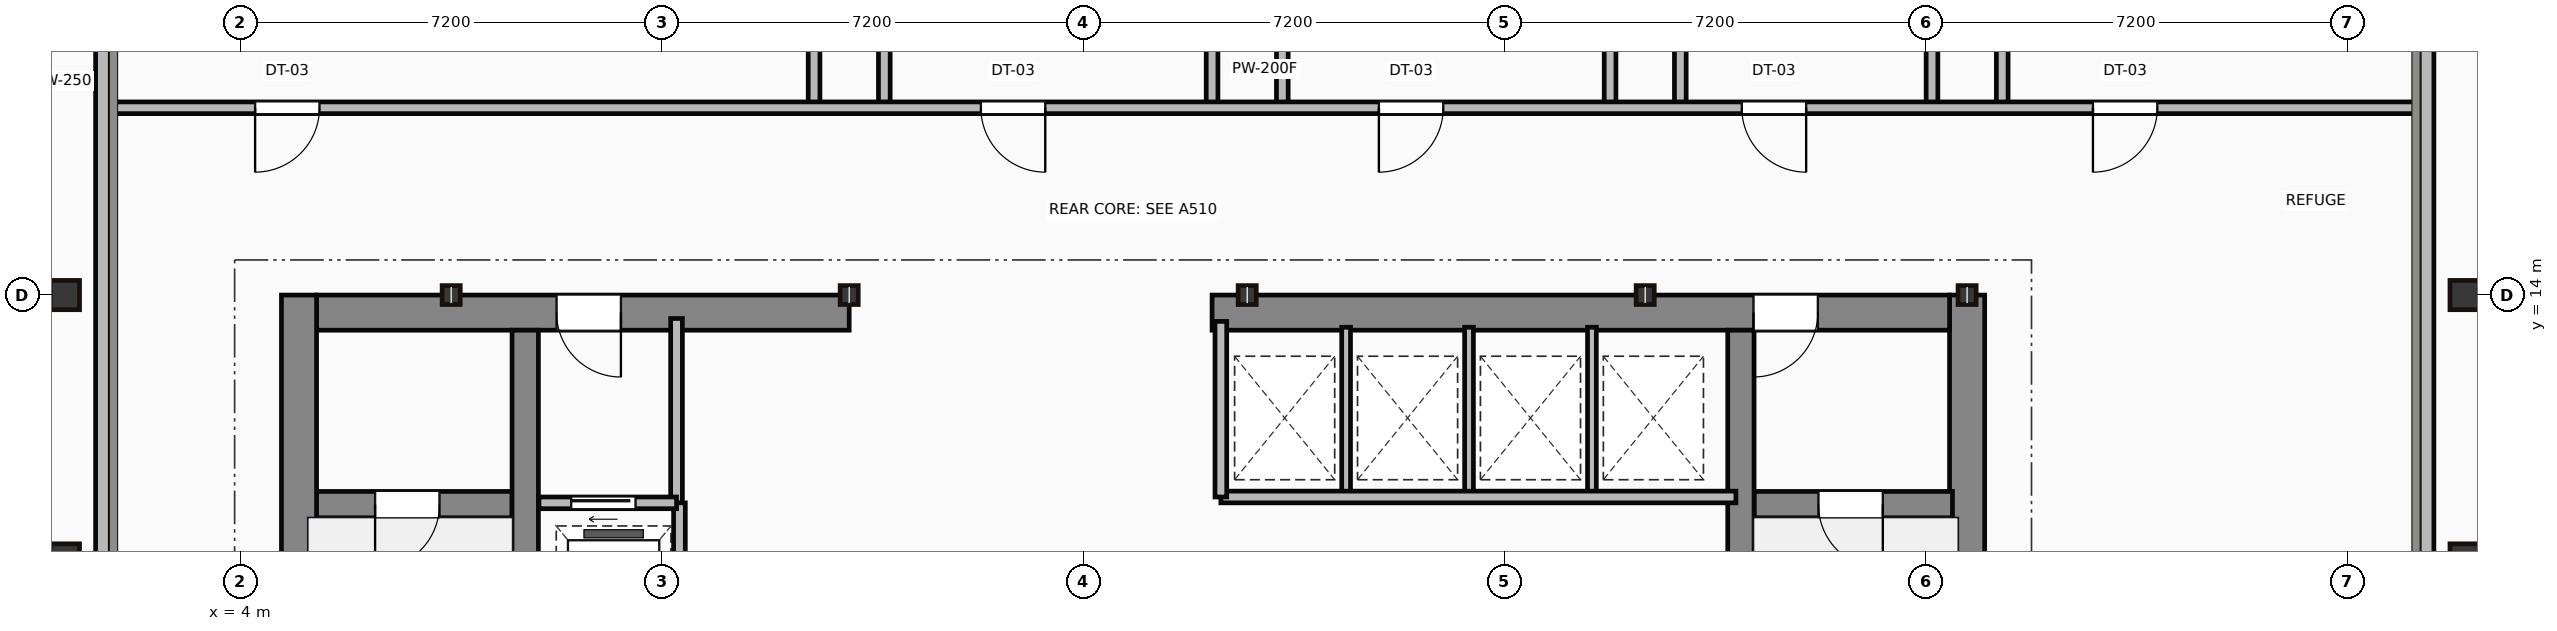
"""IFC4 building model, lengths in metres.
Left out: names, types, materials, properties, quantities, classifications, styles, units other than length and angle.
Written with IfcOpenShell. Run it as: python <this file> out.ifc"""

import sys

from ifc_helpers import new_model, si_unit, direction, frame, frame_2d, origin, origin_2d, place, context, subcontext, project, spatial, rectangle, hollow_rectangle, i_section, extrude, source, transform, mapped, element, fill, save


model = new_model("IFC4")
c1 = context("Model", 3, precision=1e-05, world=origin(), true_north=direction((0.0, 1.0)))
c2 = subcontext(c1, "Body", "Model", "MODEL_VIEW")
j1 = project(units=[si_unit("LENGTHUNIT", "METRE"), si_unit("PLANEANGLEUNIT", "RADIAN")], contexts=[c1])
p1 = place(None, origin())
s1 = spatial("IfcSite", under=j1, at=p1, CompositionType="ELEMENT")
p2 = place(p1, origin())
s2 = spatial("IfcBuilding", under=s1, at=p2, CompositionType="ELEMENT")
p3 = place(p2, frame((0.0, 0.0, 236.05)))
s3 = spatial("IfcBuildingStorey", under=s2, at=p3, CompositionType="ELEMENT", Elevation=236.05)
m1 = source(origin(), c2, "Body", "SweptSolid", [
    extrude(rectangle(XDim=13.1, YDim=0.6, at=frame_2d((6.55, 0.0))), origin(), (0.0, 0.0, 1.0), 4.5),
])
for number, where, z_axis, x_axis in (
    (1, (5.0, 0.9, 0.0), (0.0, 0.0, 1.0), (0.0, 1.0, 0.0)),
    (2, (33.5, 0.9, 0.0), (0.0, 0.0, 1.0), (0.0, 1.0, 0.0)),
):
    element("IfcWall", number, at=place(p3, frame(where, z_axis=z_axis, x_axis=x_axis)), inside=s3, PredefinedType="SHEAR", context=c2, shape_type="MappedRepresentation", body=[
        mapped(m1, transform((0.0, 0.0, 0.0))),
    ])
m2 = source(origin(), c2, "Body", "SweptSolid", [
    extrude(rectangle(XDim=9.1, YDim=0.6, at=frame_2d((4.55, 0.0))), origin(), (0.0, 0.0, 1.0), 4.5),
])
p4 = place(p3, frame((5.3, 13.7, 0.0), z_axis=(0.0, 0.0, 1.0), x_axis=(1.0, 0.0, 0.0)))
e3 = element("IfcWall", 3, at=p4, inside=s3, PredefinedType="SHEAR", context=c2, shape_type="MappedRepresentation", body=[
    mapped(m2, transform((0.0, 0.0, 0.0))),
])
p5 = place(p4, frame((4.1, 0.0, 0.0)))
e4 = element("IfcOpeningElement", 4, at=p5, cuts=e3, PredefinedType="OPENING", context=c2, shape_type="SweptSolid", body=[
    extrude(rectangle(XDim=1.1, YDim=2.15, at=frame_2d((0.55, 1.075))), frame((0.0, 0.31, 0.0), z_axis=(0.0, -1.0, 0.0), x_axis=(1.0, 0.0, 0.0)), (0.0, 0.0, 1.0), 0.62),
])
m3 = source(origin(), c2, "Body", "SweptSolid", [
    extrude(rectangle(XDim=12.6, YDim=0.6, at=frame_2d((6.3, 0.0))), origin(), (0.0, 0.0, 1.0), 4.5),
])
p6 = place(p3, frame((20.6, 13.7, 0.0), z_axis=(0.0, 0.0, 1.0), x_axis=(1.0, 0.0, 0.0)))
e5 = element("IfcWall", 5, at=p6, inside=s3, PredefinedType="SHEAR", context=c2, shape_type="MappedRepresentation", body=[
    mapped(m3, transform((0.0, 0.0, 0.0))),
])
p7 = place(p6, frame((9.25, 0.0, 0.0)))
e6 = element("IfcOpeningElement", 6, at=p7, cuts=e5, PredefinedType="OPENING", context=c2, shape_type="SweptSolid", body=[
    extrude(rectangle(XDim=1.1, YDim=2.15, at=frame_2d((0.55, 1.075))), frame((0.0, 0.31, 0.0), z_axis=(0.0, -1.0, 0.0), x_axis=(1.0, 0.0, 0.0)), (0.0, 0.0, 1.0), 0.62),
])
m4 = source(origin(), c2, "Body", "SweptSolid", [
    extrude(rectangle(XDim=12.5, YDim=0.45, at=frame_2d((6.25, 0.0))), origin(), (0.0, 0.0, 1.0), 4.5),
])
for number, where, z_axis, x_axis in (
    (7, (8.865, 0.9, 0.0), (0.0, 0.0, 1.0), (0.0, 1.0, 0.0)),
    (8, (29.635, 0.9, 0.0), (0.0, 0.0, 1.0), (0.0, 1.0, 0.0)),
):
    element("IfcWall", number, at=place(p3, frame(where, z_axis=z_axis, x_axis=x_axis)), inside=s3, PredefinedType="SHEAR", context=c2, shape_type="MappedRepresentation", body=[
        mapped(m4, transform((0.0, 0.0, 0.0))),
    ])
m5 = source(origin(), c2, "Body", "SweptSolid", [
    extrude(rectangle(XDim=3.39, YDim=0.45, at=frame_2d((1.695, 0.0))), origin(), (0.0, 0.0, 1.0), 4.5),
])
p8 = place(p3, frame((5.25, 10.42, 0.0), z_axis=(0.0, 0.0, 1.0), x_axis=(1.0, 0.0, 0.0)))
e9 = element("IfcWall", 9, at=p8, inside=s3, PredefinedType="SHEAR", context=c2, shape_type="MappedRepresentation", body=[
    mapped(m5, transform((0.0, 0.0, 0.0))),
])
p9 = place(p8, frame((1.05, 0.0, 0.0)))
e10 = element("IfcOpeningElement", 10, at=p9, cuts=e9, PredefinedType="OPENING", context=c2, shape_type="SweptSolid", body=[
    extrude(rectangle(XDim=1.1, YDim=2.15, at=frame_2d((0.55, 1.075))), frame((0.0, 0.235, 0.0), z_axis=(0.0, -1.0, 0.0), x_axis=(1.0, 0.0, 0.0)), (0.0, 0.0, 1.0), 0.47),
])
p10 = place(p3, frame((29.86, 10.42, 0.0), z_axis=(0.0, 0.0, 1.0), x_axis=(1.0, 0.0, 0.0)))
e11 = element("IfcWall", 11, at=p10, inside=s3, PredefinedType="SHEAR", context=c2, shape_type="MappedRepresentation", body=[
    mapped(m5, transform((0.0, 0.0, 0.0))),
])
p11 = place(p10, frame((1.1, 0.0, 0.0)))
e12 = element("IfcOpeningElement", 12, at=p11, cuts=e11, PredefinedType="OPENING", context=c2, shape_type="SweptSolid", body=[
    extrude(rectangle(XDim=1.1, YDim=2.15, at=frame_2d((0.55, 1.075))), frame((0.0, 0.235, 0.0), z_axis=(0.0, -1.0, 0.0), x_axis=(1.0, 0.0, 0.0)), (0.0, 0.0, 1.0), 0.47),
])
m6 = source(origin(), c2, "Body", "SweptSolid", [
    extrude(hollow_rectangle(XDim=0.5, YDim=0.5, WallThickness=0.022, at=origin_2d()), origin(), (0.0, 0.0, 1.0), 4.5),
])
for number, where, z_axis, x_axis in (
    (13, (1.0, 9.5, 0.0), (0.0, 0.0, 1.0), (1.0, 0.0, 0.0)),
    (14, (1.0, 14.0, 0.0), (0.0, 0.0, 1.0), (1.0, 0.0, 0.0)),
):
    element("IfcColumn", number, at=place(p3, frame(where, z_axis=z_axis, x_axis=x_axis)), inside=s3, PredefinedType="COLUMN", context=c2, shape_type="MappedRepresentation", body=[
        mapped(m6, transform((0.0, 0.0, 0.0))),
    ])
m7 = source(origin(), c2, "Body", "SweptSolid", [
    extrude(i_section(OverallWidth=0.309, OverallDepth=0.323, WebThickness=0.014, FlangeThickness=0.023, at=origin_2d()), origin(), (0.0, 0.0, 1.0), 4.5),
])
for number, where, z_axis, x_axis in (
    (15, (7.6, 14.0, 0.0), (0.0, 0.0, 1.0), (1.0, 0.0, 0.0)),
    (16, (14.4, 14.0, 0.0), (0.0, 0.0, 1.0), (1.0, 0.0, 0.0)),
    (17, (21.2, 14.0, 0.0), (0.0, 0.0, 1.0), (1.0, 0.0, 0.0)),
    (18, (28.0, 14.0, 0.0), (0.0, 0.0, 1.0), (1.0, 0.0, 0.0)),
    (19, (33.5, 14.0, 0.0), (0.0, 0.0, 1.0), (1.0, 0.0, 0.0)),
):
    element("IfcColumn", number, at=place(p3, frame(where, z_axis=z_axis, x_axis=x_axis)), inside=s3, PredefinedType="COLUMN", context=c2, shape_type="MappedRepresentation", body=[
        mapped(m7, transform((0.0, 0.0, 0.0))),
    ])
for number, where, z_axis, x_axis in (
    (20, (42.0, 9.5, 0.0), (0.0, 0.0, 1.0), (1.0, 0.0, 0.0)),
    (21, (42.0, 14.0, 0.0), (0.0, 0.0, 1.0), (1.0, 0.0, 0.0)),
):
    element("IfcColumn", number, at=place(p3, frame(where, z_axis=z_axis, x_axis=x_axis)), inside=s3, PredefinedType="COLUMN", context=c2, shape_type="MappedRepresentation", body=[
        mapped(m6, transform((0.0, 0.0, 0.0))),
    ])
m8 = source(origin(), c2, "Body", "SweptSolid", [
    extrude(rectangle(XDim=24.0, YDim=0.25, at=frame_2d((12.0, 0.0))), origin(), (0.0, 0.0, 1.0), 4.25),
])
p12 = place(p3, frame((1.65, 5.65, 0.0), z_axis=(0.0, 0.0, 1.0), x_axis=(0.0, 1.0, 0.0)))
e22 = element("IfcWall", 22, at=p12, inside=s3, PredefinedType="STANDARD", context=c2, shape_type="MappedRepresentation", body=[
    mapped(m8, transform((0.0, 0.0, 0.0))),
])
m9 = source(origin(), c2, "Body", "SweptSolid", [
    extrude(rectangle(XDim=22.5, YDim=0.25, at=frame_2d((11.25, 0.0))), origin(), (0.0, 0.0, 1.0), 4.25),
])
p13 = place(p3, frame((41.35, 29.65, 0.0), z_axis=(0.0, 0.0, 1.0), x_axis=(0.0, -1.0, 0.0)))
e23 = element("IfcWall", 23, at=p13, inside=s3, PredefinedType="STANDARD", context=c2, shape_type="MappedRepresentation", body=[
    mapped(m9, transform((0.0, 0.0, 0.0))),
])
m10 = source(origin(), c2, "Body", "SweptSolid", [
    extrude(rectangle(XDim=3.18, YDim=0.2, at=frame_2d((1.59, 0.0))), origin(), (0.0, 0.0, 1.0), 4.25),
])
p14 = place(p3, frame((11.45, 10.42, 0.0), z_axis=(0.0, 0.0, 1.0), x_axis=(0.0, 1.0, 0.0)))
e24 = element("IfcWall", 24, at=p14, inside=s3, PredefinedType="PARTITIONING", context=c2, shape_type="MappedRepresentation", body=[
    mapped(m10, transform((0.0, 0.0, 0.0))),
])
m11 = source(origin(), c2, "Body", "SweptSolid", [
    extrude(rectangle(XDim=2.35, YDim=0.2, at=frame_2d((1.175, 0.0))), origin(), (0.0, 0.0, 1.0), 4.25),
])
p15 = place(p3, frame((9.1, 10.45, 0.0), z_axis=(0.0, 0.0, 1.0), x_axis=(1.0, 0.0, 0.0)))
e25 = element("IfcWall", 25, at=p15, inside=s3, PredefinedType="PARTITIONING", context=c2, shape_type="MappedRepresentation", body=[
    mapped(m11, transform((0.0, 0.0, 0.0))),
])
p16 = place(p15, frame((0.55, 0.0, 0.0)))
e26 = element("IfcOpeningElement", 26, at=p16, cuts=e25, PredefinedType="OPENING", context=c2, shape_type="SweptSolid", body=[
    extrude(rectangle(XDim=1.1, YDim=2.15, at=frame_2d((0.55, 1.075))), frame((0.0, 0.11, 0.0), z_axis=(0.0, -1.0, 0.0), x_axis=(1.0, 0.0, 0.0)), (0.0, 0.0, 1.0), 0.22),
])
m12 = source(origin(), c2, "Body", "SweptSolid", [
    extrude(rectangle(XDim=9.6, YDim=0.2, at=frame_2d((4.8, 0.0))), origin(), (0.0, 0.0, 1.0), 4.25),
])
p17 = place(p3, frame((11.5, 0.85, 0.0), z_axis=(0.0, 0.0, 1.0), x_axis=(0.0, 1.0, 0.0)))
e27 = element("IfcWall", 27, at=p17, inside=s3, PredefinedType="PARTITIONING", context=c2, shape_type="MappedRepresentation", body=[
    mapped(m12, transform((0.0, 0.0, 0.0))),
])
p18 = place(p17, frame((4.2, 0.0, 0.0)))
e28 = element("IfcOpeningElement", 28, at=p18, cuts=e27, PredefinedType="OPENING", context=c2, shape_type="SweptSolid", body=[
    extrude(rectangle(XDim=1.1, YDim=2.15, at=frame_2d((0.55, 1.075))), frame((0.0, 0.11, 0.0), z_axis=(0.0, -1.0, 0.0), x_axis=(1.0, 0.0, 0.0)), (0.0, 0.0, 1.0), 0.22),
])
p19 = place(p17, frame((0.9, 0.0, 0.0)))
e29 = element("IfcOpeningElement", 29, at=p19, cuts=e27, PredefinedType="OPENING", context=c2, shape_type="SweptSolid", body=[
    extrude(rectangle(XDim=1.2, YDim=2.15, at=frame_2d((0.6, 1.075))), frame((0.0, 0.11, 0.0), z_axis=(0.0, -1.0, 0.0), x_axis=(1.0, 0.0, 0.0)), (0.0, 0.0, 1.0), 0.22),
])
m13 = source(origin(), c2, "Body", "SweptSolid", [
    extrude(rectangle(XDim=8.8, YDim=0.2, at=frame_2d((4.4, 0.0))), origin(), (0.0, 0.0, 1.0), 4.25),
])
p20 = place(p3, frame((20.75, 10.55, 0.0), z_axis=(0.0, 0.0, 1.0), x_axis=(1.0, 0.0, 0.0)))
e30 = element("IfcWall", 30, at=p20, inside=s3, PredefinedType="PARTITIONING", context=c2, shape_type="MappedRepresentation", body=[
    mapped(m13, transform((0.0, 0.0, 0.0))),
])
m14 = source(origin(), c2, "Body", "SweptSolid", [
    extrude(rectangle(XDim=3.0, YDim=0.2, at=frame_2d((1.5, 0.0))), origin(), (0.0, 0.0, 1.0), 4.25),
])
p21 = place(p3, frame((20.75, 10.55, 0.0), z_axis=(0.0, 0.0, 1.0), x_axis=(0.0, 1.0, 0.0)))
e31 = element("IfcWall", 31, at=p21, inside=s3, PredefinedType="PARTITIONING", context=c2, shape_type="MappedRepresentation", body=[
    mapped(m14, transform((0.0, 0.0, 0.0))),
])
m15 = source(origin(), c2, "Body", "SweptSolid", [
    extrude(rectangle(XDim=2.85, YDim=0.15, at=frame_2d((1.425, 0.0))), origin(), (0.0, 0.0, 1.0), 4.25),
])
for number, where, z_axis, x_axis in (
    (32, (22.89, 10.6, 0.0), (0.0, 0.0, 1.0), (0.0, 1.0, 0.0)),
    (33, (24.99, 10.6, 0.0), (0.0, 0.0, 1.0), (0.0, 1.0, 0.0)),
    (34, (27.09, 10.6, 0.0), (0.0, 0.0, 1.0), (0.0, 1.0, 0.0)),
):
    element("IfcWall", number, at=place(p3, frame(where, z_axis=z_axis, x_axis=x_axis)), inside=s3, PredefinedType="PARTITIONING", context=c2, shape_type="MappedRepresentation", body=[
        mapped(m15, transform((0.0, 0.0, 0.0))),
    ])
m16 = source(origin(), c2, "Body", "SweptSolid", [
    extrude(rectangle(XDim=39.42, YDim=0.2, at=frame_2d((19.71, 0.0))), origin(), (0.0, 0.0, 1.0), 4.25),
])
p22 = place(p3, frame((1.79, 17.2, 0.0), z_axis=(0.0, 0.0, 1.0), x_axis=(1.0, 0.0, 0.0)))
e35 = element("IfcWall", 35, at=p22, inside=s3, PredefinedType="PARTITIONING", context=c2, shape_type="MappedRepresentation", body=[
    mapped(m16, transform((0.0, 0.0, 0.0))),
])
p23 = place(p22, frame((2.46, 0.0, 0.0)))
e36 = element("IfcOpeningElement", 36, at=p23, cuts=e35, PredefinedType="OPENING", context=c2, shape_type="SweptSolid", body=[
    extrude(rectangle(XDim=1.1, YDim=2.15, at=frame_2d((0.55, 1.075))), frame((0.0, 0.11, 0.0), z_axis=(0.0, -1.0, 0.0), x_axis=(1.0, 0.0, 0.0)), (0.0, 0.0, 1.0), 0.22),
])
p24 = place(p22, frame((14.86, 0.0, 0.0)))
e37 = element("IfcOpeningElement", 37, at=p24, cuts=e35, PredefinedType="OPENING", context=c2, shape_type="SweptSolid", body=[
    extrude(rectangle(XDim=1.1, YDim=2.15, at=frame_2d((0.55, 1.075))), frame((0.0, 0.11, 0.0), z_axis=(0.0, -1.0, 0.0), x_axis=(1.0, 0.0, 0.0)), (0.0, 0.0, 1.0), 0.22),
])
p25 = place(p22, frame((21.66, 0.0, 0.0)))
e38 = element("IfcOpeningElement", 38, at=p25, cuts=e35, PredefinedType="OPENING", context=c2, shape_type="SweptSolid", body=[
    extrude(rectangle(XDim=1.1, YDim=2.15, at=frame_2d((0.55, 1.075))), frame((0.0, 0.11, 0.0), z_axis=(0.0, -1.0, 0.0), x_axis=(1.0, 0.0, 0.0)), (0.0, 0.0, 1.0), 0.22),
])
p26 = place(p22, frame((27.86, 0.0, 0.0)))
e39 = element("IfcOpeningElement", 39, at=p26, cuts=e35, PredefinedType="OPENING", context=c2, shape_type="SweptSolid", body=[
    extrude(rectangle(XDim=1.1, YDim=2.15, at=frame_2d((0.55, 1.075))), frame((0.0, 0.11, 0.0), z_axis=(0.0, -1.0, 0.0), x_axis=(1.0, 0.0, 0.0)), (0.0, 0.0, 1.0), 0.22),
])
p27 = place(p22, frame((33.86, 0.0, 0.0)))
e40 = element("IfcOpeningElement", 40, at=p27, cuts=e35, PredefinedType="OPENING", context=c2, shape_type="SweptSolid", body=[
    extrude(rectangle(XDim=1.1, YDim=2.15, at=frame_2d((0.55, 1.075))), frame((0.0, 0.11, 0.0), z_axis=(0.0, -1.0, 0.0), x_axis=(1.0, 0.0, 0.0)), (0.0, 0.0, 1.0), 0.22),
])
m17 = source(origin(), c2, "Body", "SweptSolid", [
    extrude(rectangle(XDim=11.75, YDim=0.2, at=frame_2d((5.875, 0.0))), origin(), (0.0, 0.0, 1.0), 4.25),
])
for number, where, z_axis, x_axis in (
    (41, (13.8, 17.2, 0.0), (0.0, 0.0, 1.0), (0.0, 1.0, 0.0)),
    (42, (15.0, 17.2, 0.0), (0.0, 0.0, 1.0), (0.0, 1.0, 0.0)),
    (43, (20.6, 17.2, 0.0), (0.0, 0.0, 1.0), (0.0, 1.0, 0.0)),
    (44, (21.8, 17.2, 0.0), (0.0, 0.0, 1.0), (0.0, 1.0, 0.0)),
    (45, (27.4, 17.2, 0.0), (0.0, 0.0, 1.0), (0.0, 1.0, 0.0)),
    (46, (28.6, 17.2, 0.0), (0.0, 0.0, 1.0), (0.0, 1.0, 0.0)),
    (47, (32.9, 17.2, 0.0), (0.0, 0.0, 1.0), (0.0, 1.0, 0.0)),
    (48, (34.1, 17.2, 0.0), (0.0, 0.0, 1.0), (0.0, 1.0, 0.0)),
):
    element("IfcWall", number, at=place(p3, frame(where, z_axis=z_axis, x_axis=x_axis)), inside=s3, PredefinedType="PARTITIONING", context=c2, shape_type="MappedRepresentation", body=[
        mapped(m17, transform((0.0, 0.0, 0.0))),
    ])
m18 = source(origin(), c2, "Body", "SweptSolid", [
    extrude(rectangle(XDim=1.1, YDim=2.15, at=frame_2d((0.55, 1.075))), frame((0.0, 0.025, 0.0), z_axis=(0.0, -1.0, 0.0), x_axis=(1.0, 0.0, 0.0)), (0.0, 0.0, 1.0), 0.05),
])
p28 = place(p9, frame((1.1, 0.0, 0.0), z_axis=(0.0, 0.0, 1.0), x_axis=(-1.0, 0.0, 0.0)))
e49 = element("IfcDoor", 49, at=p28, inside=s3, OperationType="SINGLE_SWING_LEFT", PredefinedType="DOOR", context=c2, shape_type="MappedRepresentation", body=[
    mapped(m18, transform((0.0, 0.0, 0.0))),
])
fill(e10, e49)
p29 = place(p11, frame((1.1, 0.0, 0.0), z_axis=(0.0, 0.0, 1.0), x_axis=(-1.0, 0.0, 0.0)))
e50 = element("IfcDoor", 50, at=p29, inside=s3, OperationType="SINGLE_SWING_RIGHT", PredefinedType="DOOR", context=c2, shape_type="MappedRepresentation", body=[
    mapped(m18, transform((0.0, 0.0, 0.0))),
])
fill(e12, e50)
p30 = place(p5, origin())
e51 = element("IfcDoor", 51, at=p30, inside=s3, OperationType="SINGLE_SWING_RIGHT", PredefinedType="DOOR", context=c2, shape_type="MappedRepresentation", body=[
    mapped(m18, transform((0.0, 0.0, 0.0))),
])
fill(e4, e51)
p31 = place(p7, origin())
e52 = element("IfcDoor", 52, at=p31, inside=s3, OperationType="SINGLE_SWING_LEFT", PredefinedType="DOOR", context=c2, shape_type="MappedRepresentation", body=[
    mapped(m18, transform((0.0, 0.0, 0.0))),
])
fill(e6, e52)
p32 = place(p16, origin())
e53 = element("IfcDoor", 53, at=p32, inside=s3, OperationType="SLIDING_TO_LEFT", PredefinedType="DOOR", context=c2, shape_type="MappedRepresentation", body=[
    mapped(m18, transform((0.0, 0.0, 0.0))),
])
fill(e26, e53)
p33 = place(p23, origin())
e54 = element("IfcDoor", 54, at=p33, inside=s3, OperationType="SINGLE_SWING_LEFT", PredefinedType="DOOR", context=c2, shape_type="MappedRepresentation", body=[
    mapped(m18, transform((0.0, 0.0, 0.0))),
])
fill(e36, e54)
p34 = place(p24, origin())
e55 = element("IfcDoor", 55, at=p34, inside=s3, OperationType="SINGLE_SWING_RIGHT", PredefinedType="DOOR", context=c2, shape_type="MappedRepresentation", body=[
    mapped(m18, transform((0.0, 0.0, 0.0))),
])
fill(e37, e55)
p35 = place(p25, origin())
e56 = element("IfcDoor", 56, at=p35, inside=s3, OperationType="SINGLE_SWING_LEFT", PredefinedType="DOOR", context=c2, shape_type="MappedRepresentation", body=[
    mapped(m18, transform((0.0, 0.0, 0.0))),
])
fill(e38, e56)
p36 = place(p26, origin())
e57 = element("IfcDoor", 57, at=p36, inside=s3, OperationType="SINGLE_SWING_RIGHT", PredefinedType="DOOR", context=c2, shape_type="MappedRepresentation", body=[
    mapped(m18, transform((0.0, 0.0, 0.0))),
])
fill(e39, e57)
p37 = place(p27, origin())
e58 = element("IfcDoor", 58, at=p37, inside=s3, OperationType="SINGLE_SWING_LEFT", PredefinedType="DOOR", context=c2, shape_type="MappedRepresentation", body=[
    mapped(m18, transform((0.0, 0.0, 0.0))),
])
fill(e40, e58)
save(model, sys.argv[1])
